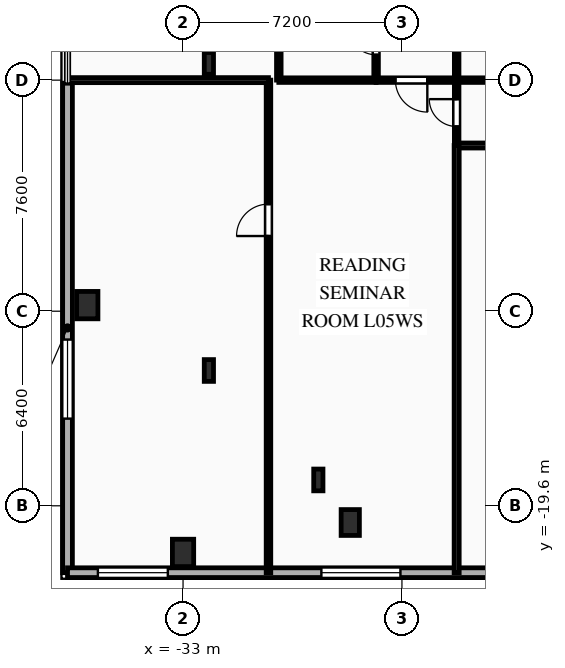
"""IFC4 building model, lengths in metres.
Left out: names, types, materials, properties, quantities, classifications, styles, units other than length and angle.
Written with IfcOpenShell. Run it as: python <this file> out.ifc"""

import sys

from ifc_helpers import new_model, si_unit, direction, frame, frame_2d, origin, origin_2d, place, context, subcontext, project, spatial, rectangle, i_section, extrude, element, fill, save


model = new_model("IFC4")
c1 = context("Model", 3, precision=1e-05, world=origin(), true_north=direction((0.0, 1.0)))
c2 = subcontext(c1, "Body", "Model", "MODEL_VIEW")
j1 = project(units=[si_unit("LENGTHUNIT", "METRE"), si_unit("PLANEANGLEUNIT", "RADIAN")], contexts=[c1])
p1 = place(None, origin())
s1 = spatial("IfcSite", under=j1, at=p1, CompositionType="ELEMENT")
p2 = place(p1, origin())
s2 = spatial("IfcBuilding", under=s1, at=p2, CompositionType="ELEMENT")
p3 = place(p2, frame((0.0, 0.0, 22.5)))
s3 = spatial("IfcBuildingStorey", under=s2, at=p3, CompositionType="ELEMENT", Elevation=22.5)
for number, where, z_axis, x_axis in (
    (1, (-33.0, -21.15, 0.0), (0.0, 0.0, 1.0), (1.0, 0.0, 0.0)),
    (2, (-36.15, -13.0, 0.0), (0.0, 0.0, 1.0), (1.0, 0.0, 0.0)),
):
    element("IfcColumn", number, at=place(p3, frame(where, z_axis=z_axis, x_axis=x_axis)), inside=s3, PredefinedType="COLUMN", context=c2, shape_type="SweptSolid", body=[
        extrude(rectangle(XDim=0.7, YDim=0.9, at=origin_2d()), origin(), (0.0, 0.0, 1.0), 4.5),
    ])
p4 = place(p3, frame((-27.5, -20.15, 0.0), z_axis=(0.0, 0.0, 1.0), x_axis=(1.0, 0.0, 0.0)))
e3 = element("IfcColumn", 3, at=p4, inside=s3, PredefinedType="PILASTER", context=c2, shape_type="SweptSolid", body=[
    extrude(rectangle(XDim=0.6, YDim=0.85, at=origin_2d()), origin(), (0.0, 0.0, 1.0), 4.5),
])
for number, where, z_axis, x_axis in (
    (4, (-28.55, -18.75, 0.0), (0.0, 0.0, 1.0), (1.0, 0.0, 0.0)),
    (5, (-32.15, -5.05, 0.0), (0.0, 0.0, 1.0), (1.0, 0.0, 0.0)),
    (6, (-32.15, -15.15, 0.0), (0.0, 0.0, 1.0), (1.0, 0.0, 0.0)),
):
    element("IfcColumn", number, at=place(p3, frame(where, z_axis=z_axis, x_axis=x_axis)), inside=s3, PredefinedType="COLUMN", context=c2, shape_type="SweptSolid", body=[
        extrude(i_section(OverallWidth=0.304, OverallDepth=0.716, WebThickness=0.021, FlangeThickness=0.04, FilletRadius=0.027, at=origin_2d()), origin(), (0.0, 0.0, 1.0), 4.5),
    ])
p5 = place(p3, frame((-36.8, -21.8, 0.0), z_axis=(0.0, 0.0, 1.0), x_axis=(0.0, 1.0, 0.0)))
e7 = element("IfcWall", 7, at=p5, inside=s3, PredefinedType="SOLIDWALL", context=c2, shape_type="SweptSolid", body=[
    extrude(rectangle(XDim=16.1, YDim=0.32, at=frame_2d((8.05, 0.0))), origin(), (0.0, 0.0, 1.0), 4.16),
])
p6 = place(p5, frame((5.067, 0.0, 0.85)))
e8 = element("IfcOpeningElement", 8, at=p6, cuts=e7, PredefinedType="OPENING", context=c2, shape_type="SweptSolid", body=[
    extrude(rectangle(XDim=2.6, YDim=2.4, at=frame_2d((1.3, 1.2))), frame((0.0, 0.17, 0.0), z_axis=(0.0, -1.0, 0.0), x_axis=(1.0, 0.0, 0.0)), (0.0, 0.0, 1.0), 0.34),
])
p7 = place(p3, frame((36.8, -21.8, 0.0), z_axis=(0.0, 0.0, 1.0), x_axis=(-1.0, 0.0, 0.0)))
e9 = element("IfcWall", 9, at=p7, inside=s3, PredefinedType="SOLIDWALL", context=c2, shape_type="SweptSolid", body=[
    extrude(rectangle(XDim=73.6, YDim=0.32, at=frame_2d((36.8, 0.0))), origin(), (0.0, 0.0, 1.0), 4.16),
])
p8 = place(p7, frame((1.079, 0.0, 0.85)))
e10 = element("IfcOpeningElement", 10, at=p8, cuts=e9, PredefinedType="OPENING", context=c2, shape_type="SweptSolid", body=[
    extrude(rectangle(XDim=2.3, YDim=2.4, at=frame_2d((1.15, 1.2))), frame((0.0, 0.17, 0.0), z_axis=(0.0, -1.0, 0.0), x_axis=(1.0, 0.0, 0.0)), (0.0, 0.0, 1.0), 0.34),
])
p9 = place(p7, frame((8.431, 0.0, 0.85)))
e11 = element("IfcOpeningElement", 11, at=p9, cuts=e9, PredefinedType="OPENING", context=c2, shape_type="SweptSolid", body=[
    extrude(rectangle(XDim=2.6, YDim=2.4, at=frame_2d((1.3, 1.2))), frame((0.0, 0.17, 0.0), z_axis=(0.0, -1.0, 0.0), x_axis=(1.0, 0.0, 0.0)), (0.0, 0.0, 1.0), 0.34),
])
p10 = place(p7, frame((29.293, 0.0, 0.85)))
e12 = element("IfcOpeningElement", 12, at=p10, cuts=e9, PredefinedType="OPENING", context=c2, shape_type="SweptSolid", body=[
    extrude(rectangle(XDim=2.6, YDim=2.4, at=frame_2d((1.3, 1.2))), frame((0.0, 0.17, 0.0), z_axis=(0.0, -1.0, 0.0), x_axis=(1.0, 0.0, 0.0)), (0.0, 0.0, 1.0), 0.34),
])
p11 = place(p7, frame((49.195, 0.0, 0.85)))
e13 = element("IfcOpeningElement", 13, at=p11, cuts=e9, PredefinedType="OPENING", context=c2, shape_type="SweptSolid", body=[
    extrude(rectangle(XDim=2.6, YDim=2.4, at=frame_2d((1.3, 1.2))), frame((0.0, 0.17, 0.0), z_axis=(0.0, -1.0, 0.0), x_axis=(1.0, 0.0, 0.0)), (0.0, 0.0, 1.0), 0.34),
])
p12 = place(p7, frame((62.649, 0.0, 0.85)))
e14 = element("IfcOpeningElement", 14, at=p12, cuts=e9, PredefinedType="OPENING", context=c2, shape_type="SweptSolid", body=[
    extrude(rectangle(XDim=2.6, YDim=2.4, at=frame_2d((1.3, 1.2))), frame((0.0, 0.17, 0.0), z_axis=(0.0, -1.0, 0.0), x_axis=(1.0, 0.0, 0.0)), (0.0, 0.0, 1.0), 0.34),
])
p13 = place(p7, frame((70.301, 0.0, 0.85)))
e15 = element("IfcOpeningElement", 15, at=p13, cuts=e9, PredefinedType="OPENING", context=c2, shape_type="SweptSolid", body=[
    extrude(rectangle(XDim=2.3, YDim=2.4, at=frame_2d((1.15, 1.2))), frame((0.0, 0.17, 0.0), z_axis=(0.0, -1.0, 0.0), x_axis=(1.0, 0.0, 0.0)), (0.0, 0.0, 1.0), 0.34),
])
p14 = place(p3, frame((-24.0, -7.75, 0.0), z_axis=(0.0, 0.0, 1.0), x_axis=(0.0, 1.0, 0.0)))
e16 = element("IfcWall", 16, at=p14, inside=s3, PredefinedType="PARTITIONING", context=c2, shape_type="SweptSolid", body=[
    extrude(rectangle(XDim=2.15, YDim=0.15, at=frame_2d((1.075, 0.0))), origin(), (0.0, 0.0, 1.0), 4.16),
])
p15 = place(p14, frame((0.625, 0.0, 0.0)))
e17 = element("IfcOpeningElement", 17, at=p15, cuts=e16, PredefinedType="OPENING", context=c2, shape_type="SweptSolid", body=[
    extrude(rectangle(XDim=0.9, YDim=2.1, at=frame_2d((0.45, 1.05))), frame((0.0, 0.085, 0.0), z_axis=(0.0, -1.0, 0.0), x_axis=(1.0, 0.0, 0.0)), (0.0, 0.0, 1.0), 0.17),
])
p16 = place(p3, frame((-24.0, -5.6, 0.0), z_axis=(0.0, 0.0, 1.0), x_axis=(1.0, 0.0, 0.0)))
e18 = element("IfcWall", 18, at=p16, inside=s3, PredefinedType="PARTITIONING", context=c2, shape_type="SweptSolid", body=[
    extrude(rectangle(XDim=5.2, YDim=0.15, at=frame_2d((2.6, 0.0))), origin(), (0.0, 0.0, 1.0), 4.16),
])
p17 = place(p3, frame((-3.32, -7.75, 0.0), z_axis=(0.0, 0.0, 1.0), x_axis=(-1.0, 0.0, 0.0)))
e19 = element("IfcWall", 19, at=p17, inside=s3, PredefinedType="PARTITIONING", context=c2, shape_type="SweptSolid", body=[
    extrude(rectangle(XDim=20.68, YDim=0.165, at=frame_2d((10.34, 0.0))), origin(), (0.0, 0.0, 1.0), 4.16),
])
p18 = place(p17, frame((9.64, 0.0, 0.0)))
e20 = element("IfcOpeningElement", 20, at=p18, cuts=e19, PredefinedType="OPENING", context=c2, shape_type="SweptSolid", body=[
    extrude(rectangle(XDim=1.4, YDim=2.3, at=frame_2d((0.7, 1.15))), frame((0.0, 0.093, 0.0), z_axis=(0.0, -1.0, 0.0), x_axis=(1.0, 0.0, 0.0)), (0.0, 0.0, 1.0), 0.185),
])
p19 = place(p3, frame((-24.0, -5.6, 0.0), z_axis=(0.0, 0.0, 1.0), x_axis=(-1.0, 0.0, 0.0)))
e21 = element("IfcWall", 21, at=p19, inside=s3, PredefinedType="PARTITIONING", context=c2, shape_type="SweptSolid", body=[
    extrude(rectangle(XDim=2.65, YDim=0.15, at=frame_2d((1.325, 0.0))), origin(), (0.0, 0.0, 1.0), 4.16),
])
p20 = place(p19, frame((0.965, 0.0, 0.0)))
e22 = element("IfcOpeningElement", 22, at=p20, cuts=e21, PredefinedType="OPENING", context=c2, shape_type="SweptSolid", body=[
    extrude(rectangle(XDim=1.05, YDim=2.15, at=frame_2d((0.525, 1.075))), frame((0.0, 0.085, 0.0), z_axis=(0.0, -1.0, 0.0), x_axis=(1.0, 0.0, 0.0)), (0.0, 0.0, 1.0), 0.17),
])
p21 = place(p3, frame((-26.65, -5.6, 0.0), z_axis=(0.0, 0.0, 1.0), x_axis=(0.0, 1.0, 0.0)))
e23 = element("IfcWall", 23, at=p21, inside=s3, PredefinedType="PLUMBINGWALL", context=c2, shape_type="SweptSolid", body=[
    extrude(rectangle(XDim=2.35, YDim=0.15, at=frame_2d((1.175, 0.0))), origin(), (0.0, 0.0, 1.0), 4.16),
])
p22 = place(p21, frame((0.834, 0.0, 0.0)))
e24 = element("IfcOpeningElement", 24, at=p22, cuts=e23, PredefinedType="OPENING", context=c2, shape_type="SweptSolid", body=[
    extrude(rectangle(XDim=0.9, YDim=2.1, at=frame_2d((0.45, 1.05))), frame((0.0, 0.085, 0.0), z_axis=(0.0, -1.0, 0.0), x_axis=(1.0, 0.0, 0.0)), (0.0, 0.0, 1.0), 0.17),
])
p23 = place(p3, frame((-24.0, 8.5, 0.0), z_axis=(0.0, 0.0, 1.0), x_axis=(0.0, -1.0, 0.0)))
e25 = element("IfcWall", 25, at=p23, inside=s3, PredefinedType="PARTITIONING", context=c2, shape_type="SweptSolid", body=[
    extrude(rectangle(XDim=14.1, YDim=0.15, at=frame_2d((7.05, 0.0))), origin(), (0.0, 0.0, 1.0), 4.16),
])
p24 = place(p3, frame((-30.19, -21.8, 0.0), z_axis=(0.0, 0.0, 1.0), x_axis=(0.0, 1.0, 0.0)))
e26 = element("IfcWall", 26, at=p24, inside=s3, PredefinedType="PARTITIONING", context=c2, shape_type="SweptSolid", body=[
    extrude(rectangle(XDim=16.2, YDim=0.15, at=frame_2d((8.1, 0.0))), origin(), (0.0, 0.0, 1.0), 4.16),
])
p25 = place(p24, frame((11.073, 0.0, 0.0)))
e27 = element("IfcOpeningElement", 27, at=p25, cuts=e26, PredefinedType="OPENING", context=c2, shape_type="SweptSolid", body=[
    extrude(rectangle(XDim=1.05, YDim=2.15, at=frame_2d((0.525, 1.075))), frame((0.0, 0.085, 0.0), z_axis=(0.0, -1.0, 0.0), x_axis=(1.0, 0.0, 0.0)), (0.0, 0.0, 1.0), 0.17),
])
p26 = place(p3, frame((-29.85, -5.6, 0.0), z_axis=(0.0, 0.0, 1.0), x_axis=(1.0, 0.0, 0.0)))
e28 = element("IfcWall", 28, at=p26, inside=s3, PredefinedType="PLUMBINGWALL", context=c2, shape_type="SweptSolid", body=[
    extrude(rectangle(XDim=3.2, YDim=0.15, at=frame_2d((1.6, 0.0))), origin(), (0.0, 0.0, 1.0), 4.16),
])
p27 = place(p3, frame((-24.0, -7.75, 0.0), z_axis=(0.0, 0.0, 1.0), x_axis=(0.0, -1.0, 0.0)))
e29 = element("IfcWall", 29, at=p27, inside=s3, PredefinedType="PARTITIONING", context=c2, shape_type="SweptSolid", body=[
    extrude(rectangle(XDim=14.05, YDim=0.165, at=frame_2d((7.025, 0.0))), origin(), (0.0, 0.0, 1.0), 4.16),
])
p28 = place(p3, frame((-36.8, -5.6, 0.0), z_axis=(0.0, 0.0, 1.0), x_axis=(1.0, 0.0, 0.0)))
e30 = element("IfcWall", 30, at=p28, inside=s3, PredefinedType="PARTITIONING", context=c2, shape_type="SweptSolid", body=[
    extrude(rectangle(XDim=6.61, YDim=0.165, at=frame_2d((3.305, 0.0))), origin(), (0.0, 0.0, 1.0), 4.16),
])
p29 = place(p3, frame((-29.85, -5.6, 0.0), z_axis=(0.0, 0.0, 1.0), x_axis=(0.0, 1.0, 0.0)))
e31 = element("IfcWall", 31, at=p29, inside=s3, PredefinedType="PLUMBINGWALL", context=c2, shape_type="SweptSolid", body=[
    extrude(rectangle(XDim=2.35, YDim=0.15, at=frame_2d((1.175, 0.0))), origin(), (0.0, 0.0, 1.0), 4.16),
])
p30 = place(p6, origin())
e32 = element("IfcWindow", 32, at=p30, inside=s3, PartitioningType="SINGLE_PANEL", PredefinedType="WINDOW", context=c2, shape_type="SweptSolid", body=[
    extrude(rectangle(XDim=2.6, YDim=2.4, at=frame_2d((1.3, 1.2))), frame((0.0, 0.03, 0.0), z_axis=(0.0, -1.0, 0.0), x_axis=(1.0, 0.0, 0.0)), (0.0, 0.0, 1.0), 0.06),
])
fill(e8, e32)
p31 = place(p12, origin())
e33 = element("IfcWindow", 33, at=p31, inside=s3, PartitioningType="SINGLE_PANEL", PredefinedType="WINDOW", context=c2, shape_type="SweptSolid", body=[
    extrude(rectangle(XDim=2.6, YDim=2.4, at=frame_2d((1.3, 1.2))), frame((0.0, 0.03, 0.0), z_axis=(0.0, -1.0, 0.0), x_axis=(1.0, 0.0, 0.0)), (0.0, 0.0, 1.0), 0.06),
])
fill(e14, e33)
p32 = place(p13, origin())
e34 = element("IfcWindow", 34, at=p32, inside=s3, PartitioningType="SINGLE_PANEL", PredefinedType="WINDOW", context=c2, shape_type="SweptSolid", body=[
    extrude(rectangle(XDim=2.3, YDim=2.4, at=frame_2d((1.15, 1.2))), frame((0.0, 0.03, 0.0), z_axis=(0.0, -1.0, 0.0), x_axis=(1.0, 0.0, 0.0)), (0.0, 0.0, 1.0), 0.06),
])
fill(e15, e34)
p33 = place(p15, origin())
e35 = element("IfcDoor", 35, at=p33, inside=s3, OperationType="SINGLE_SWING_RIGHT", PredefinedType="DOOR", context=c2, shape_type="SweptSolid", body=[
    extrude(rectangle(XDim=0.9, YDim=2.1, at=frame_2d((0.45, 1.05))), frame((0.0, 0.025, 0.0), z_axis=(0.0, -1.0, 0.0), x_axis=(1.0, 0.0, 0.0)), (0.0, 0.0, 1.0), 0.05),
])
fill(e17, e35)
p34 = place(p20, origin())
e36 = element("IfcDoor", 36, at=p34, inside=s3, OperationType="SINGLE_SWING_LEFT", PredefinedType="DOOR", context=c2, shape_type="SweptSolid", body=[
    extrude(rectangle(XDim=1.05, YDim=2.15, at=frame_2d((0.525, 1.075))), frame((0.0, 0.025, 0.0), z_axis=(0.0, -1.0, 0.0), x_axis=(1.0, 0.0, 0.0)), (0.0, 0.0, 1.0), 0.05),
])
fill(e22, e36)
p35 = place(p22, origin())
e37 = element("IfcDoor", 37, at=p35, inside=s3, OperationType="SINGLE_SWING_RIGHT", PredefinedType="DOOR", context=c2, shape_type="SweptSolid", body=[
    extrude(rectangle(XDim=0.9, YDim=2.1, at=frame_2d((0.45, 1.05))), frame((0.0, 0.025, 0.0), z_axis=(0.0, -1.0, 0.0), x_axis=(1.0, 0.0, 0.0)), (0.0, 0.0, 1.0), 0.05),
])
fill(e24, e37)
p36 = place(p25, origin())
e38 = element("IfcDoor", 38, at=p36, inside=s3, OperationType="SINGLE_SWING_LEFT", PredefinedType="DOOR", context=c2, shape_type="SweptSolid", body=[
    extrude(rectangle(XDim=1.05, YDim=2.15, at=frame_2d((0.525, 1.075))), frame((0.0, 0.025, 0.0), z_axis=(0.0, -1.0, 0.0), x_axis=(1.0, 0.0, 0.0)), (0.0, 0.0, 1.0), 0.05),
])
fill(e27, e38)
save(model, sys.argv[1])
